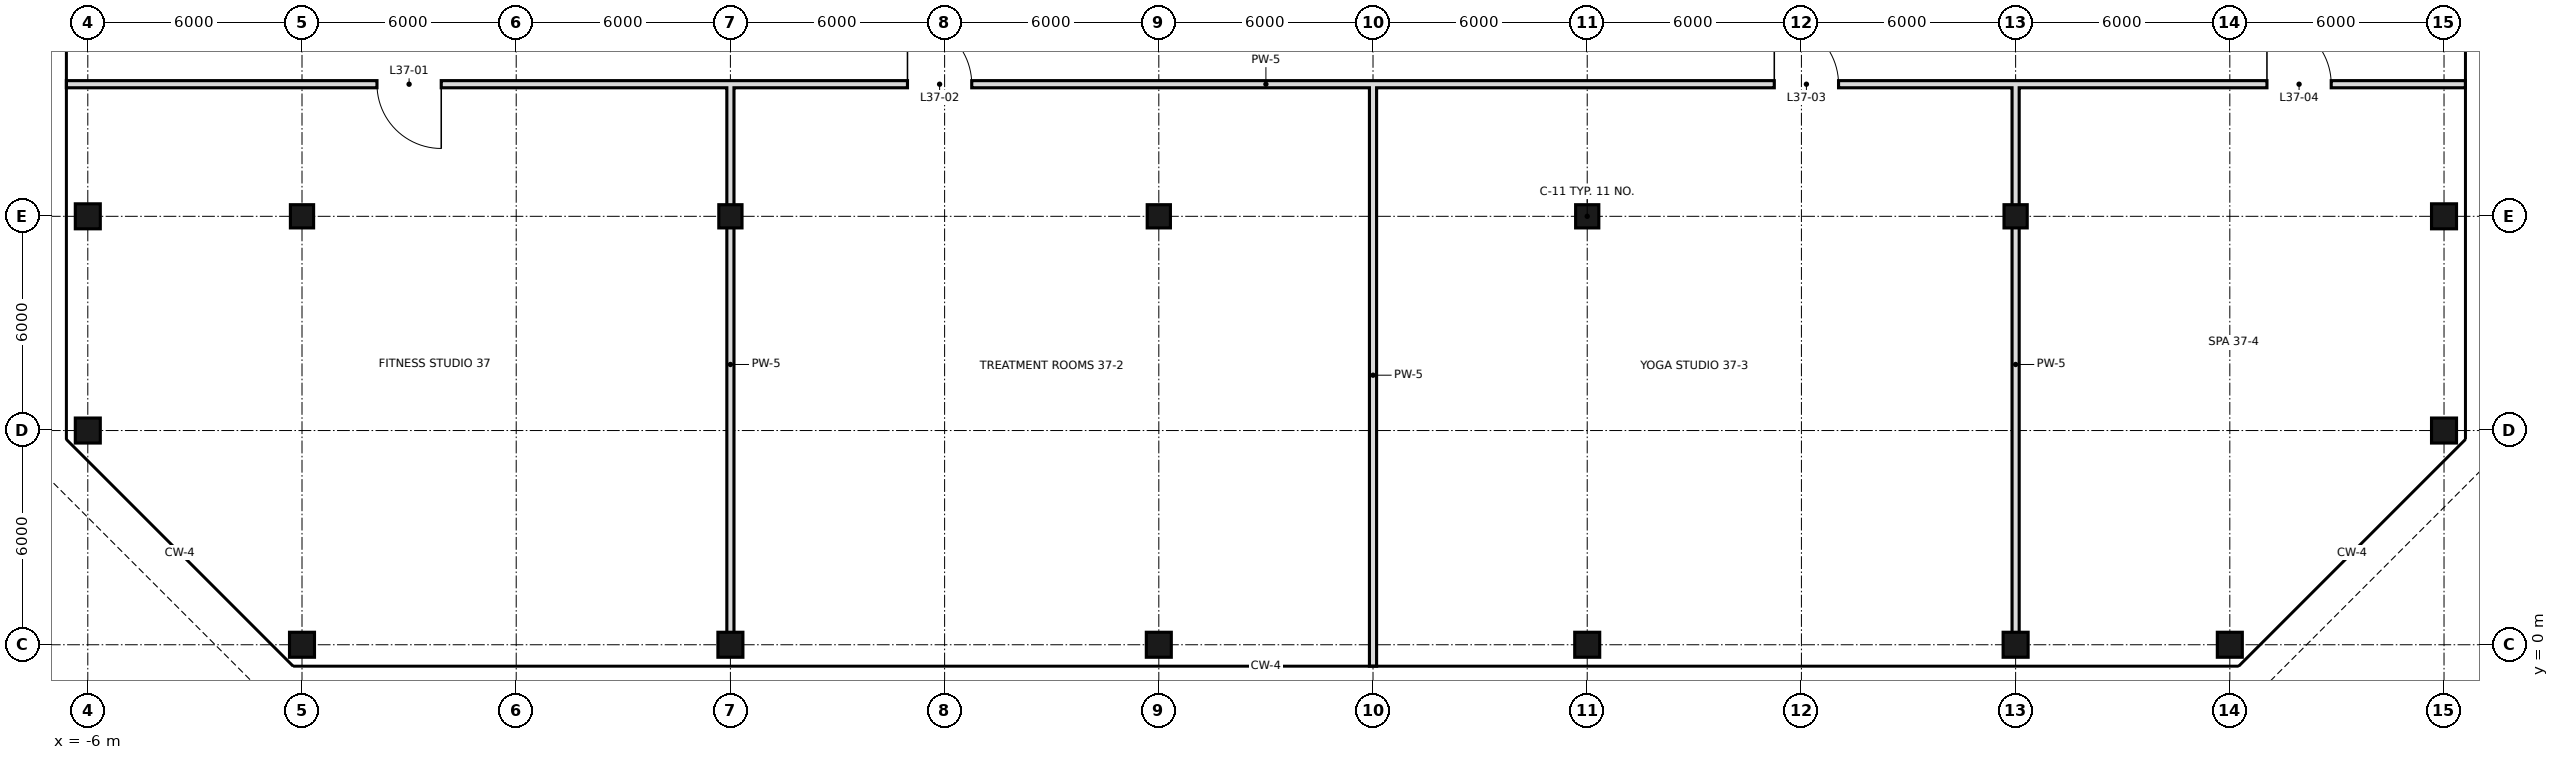
"""IFC4 building model, lengths in metres.
Left out: names, types, materials, properties, quantities, classifications, styles, units other than length and angle.
Written with IfcOpenShell. Run it as: python <this file> out.ifc"""

import sys

from ifc_helpers import new_model, si_unit, direction, frame, frame_2d, origin, origin_2d, place, context, subcontext, project, spatial, rectangle, hollow_rectangle, extrude, element, fill, save


model = new_model("IFC4")
c1 = context("Model", 3, precision=1e-05, world=origin(), true_north=direction((0.0, 1.0)))
c2 = subcontext(c1, "Body", "Model", "MODEL_VIEW")
j1 = project(units=[si_unit("LENGTHUNIT", "METRE"), si_unit("PLANEANGLEUNIT", "RADIAN")], contexts=[c1])
p1 = place(None, origin())
s1 = spatial("IfcSite", under=j1, at=p1, CompositionType="ELEMENT")
p2 = place(p1, origin())
s2 = spatial("IfcBuilding", under=s1, at=p2, CompositionType="ELEMENT")
p3 = place(p2, frame((0.0, 0.0, 161.8)))
s3 = spatial("IfcBuildingStorey", under=s2, at=p3, CompositionType="ELEMENT", Elevation=161.8)
for number, where, z_axis, x_axis in (
    (1, (-6.0, 6.0, 0.0), (0.0, 0.0, 1.0), (1.0, 0.0, 0.0)),
    (2, (-6.0, 12.0, 0.0), (0.0, 0.0, 1.0), (1.0, 0.0, 0.0)),
    (3, (0.0, 0.0, 0.0), (0.0, 0.0, 1.0), (1.0, 0.0, 0.0)),
):
    element("IfcColumn", number, at=place(p3, frame(where, z_axis=z_axis, x_axis=x_axis)), inside=s3, PredefinedType="COLUMN", context=c2, shape_type="SweptSolid", body=[
        extrude(hollow_rectangle(XDim=0.7, YDim=0.7, WallThickness=0.036, at=origin_2d()), origin(), (0.0, 0.0, 1.0), 5.4),
    ])
p4 = place(p3, frame((0.0, 12.0, 0.0), z_axis=(0.0, 0.0, 1.0), x_axis=(1.0, 0.0, 0.0)))
e4 = element("IfcColumn", 4, at=p4, inside=s3, PredefinedType="COLUMN", context=c2, shape_type="SweptSolid", body=[
    extrude(hollow_rectangle(XDim=0.65, YDim=0.65, WallThickness=0.032, at=origin_2d()), origin(), (0.0, 0.0, 1.0), 5.4),
])
p5 = place(p3, frame((12.0, 0.0, 0.0), z_axis=(0.0, 0.0, 1.0), x_axis=(1.0, 0.0, 0.0)))
e5 = element("IfcColumn", 5, at=p5, inside=s3, PredefinedType="COLUMN", context=c2, shape_type="SweptSolid", body=[
    extrude(hollow_rectangle(XDim=0.7, YDim=0.7, WallThickness=0.036, at=origin_2d()), origin(), (0.0, 0.0, 1.0), 5.4),
])
p6 = place(p3, frame((12.0, 12.0, 0.0), z_axis=(0.0, 0.0, 1.0), x_axis=(1.0, 0.0, 0.0)))
e6 = element("IfcColumn", 6, at=p6, inside=s3, PredefinedType="COLUMN", context=c2, shape_type="SweptSolid", body=[
    extrude(hollow_rectangle(XDim=0.65, YDim=0.65, WallThickness=0.032, at=origin_2d()), origin(), (0.0, 0.0, 1.0), 5.4),
])
p7 = place(p3, frame((24.0, 0.0, 0.0), z_axis=(0.0, 0.0, 1.0), x_axis=(1.0, 0.0, 0.0)))
e7 = element("IfcColumn", 7, at=p7, inside=s3, PredefinedType="COLUMN", context=c2, shape_type="SweptSolid", body=[
    extrude(hollow_rectangle(XDim=0.7, YDim=0.7, WallThickness=0.036, at=origin_2d()), origin(), (0.0, 0.0, 1.0), 5.4),
])
p8 = place(p3, frame((24.0, 12.0, 0.0), z_axis=(0.0, 0.0, 1.0), x_axis=(1.0, 0.0, 0.0)))
e8 = element("IfcColumn", 8, at=p8, inside=s3, PredefinedType="COLUMN", context=c2, shape_type="SweptSolid", body=[
    extrude(hollow_rectangle(XDim=0.65, YDim=0.65, WallThickness=0.032, at=origin_2d()), origin(), (0.0, 0.0, 1.0), 5.4),
])
p9 = place(p3, frame((36.0, 0.0, 0.0), z_axis=(0.0, 0.0, 1.0), x_axis=(1.0, 0.0, 0.0)))
e9 = element("IfcColumn", 9, at=p9, inside=s3, PredefinedType="COLUMN", context=c2, shape_type="SweptSolid", body=[
    extrude(hollow_rectangle(XDim=0.7, YDim=0.7, WallThickness=0.036, at=origin_2d()), origin(), (0.0, 0.0, 1.0), 5.4),
])
p10 = place(p3, frame((36.0, 12.0, 0.0), z_axis=(0.0, 0.0, 1.0), x_axis=(1.0, 0.0, 0.0)))
e10 = element("IfcColumn", 10, at=p10, inside=s3, PredefinedType="COLUMN", context=c2, shape_type="SweptSolid", body=[
    extrude(hollow_rectangle(XDim=0.65, YDim=0.65, WallThickness=0.032, at=origin_2d()), origin(), (0.0, 0.0, 1.0), 5.4),
])
p11 = place(p3, frame((48.0, 0.0, 0.0), z_axis=(0.0, 0.0, 1.0), x_axis=(1.0, 0.0, 0.0)))
e11 = element("IfcColumn", 11, at=p11, inside=s3, PredefinedType="COLUMN", context=c2, shape_type="SweptSolid", body=[
    extrude(hollow_rectangle(XDim=0.7, YDim=0.7, WallThickness=0.036, at=origin_2d()), origin(), (0.0, 0.0, 1.0), 5.4),
])
p12 = place(p3, frame((48.0, 12.0, 0.0), z_axis=(0.0, 0.0, 1.0), x_axis=(1.0, 0.0, 0.0)))
e12 = element("IfcColumn", 12, at=p12, inside=s3, PredefinedType="COLUMN", context=c2, shape_type="SweptSolid", body=[
    extrude(hollow_rectangle(XDim=0.65, YDim=0.65, WallThickness=0.032, at=origin_2d()), origin(), (0.0, 0.0, 1.0), 5.4),
])
for number, where, z_axis, x_axis in (
    (13, (54.0, 0.0, 0.0), (0.0, 0.0, 1.0), (1.0, 0.0, 0.0)),
    (14, (60.0, 6.0, 0.0), (0.0, 0.0, 1.0), (1.0, 0.0, 0.0)),
    (15, (60.0, 12.0, 0.0), (0.0, 0.0, 1.0), (1.0, 0.0, 0.0)),
):
    element("IfcColumn", number, at=place(p3, frame(where, z_axis=z_axis, x_axis=x_axis)), inside=s3, PredefinedType="COLUMN", context=c2, shape_type="SweptSolid", body=[
        extrude(hollow_rectangle(XDim=0.7, YDim=0.7, WallThickness=0.036, at=origin_2d()), origin(), (0.0, 0.0, 1.0), 5.4),
    ])
p13 = place(p3, frame((12.0, 0.0, 0.0), z_axis=(0.0, 0.0, 1.0), x_axis=(0.0, 1.0, 0.0)))
e16 = element("IfcWall", 16, at=p13, inside=s3, PredefinedType="SOLIDWALL", context=c2, shape_type="SweptSolid", body=[
    extrude(rectangle(XDim=15.7, YDim=0.2, at=frame_2d((7.85, 0.0))), origin(), (0.0, 0.0, 1.0), 4.52),
])
p14 = place(p3, frame((30.0, -0.6, 0.0), z_axis=(0.0, 0.0, 1.0), x_axis=(0.0, 1.0, 0.0)))
e17 = element("IfcWall", 17, at=p14, inside=s3, PredefinedType="SOLIDWALL", context=c2, shape_type="SweptSolid", body=[
    extrude(rectangle(XDim=16.3, YDim=0.2, at=frame_2d((8.15, 0.0))), origin(), (0.0, 0.0, 1.0), 4.52),
])
p15 = place(p3, frame((48.0, 0.0, 0.0), z_axis=(0.0, 0.0, 1.0), x_axis=(0.0, 1.0, 0.0)))
e18 = element("IfcWall", 18, at=p15, inside=s3, PredefinedType="SOLIDWALL", context=c2, shape_type="SweptSolid", body=[
    extrude(rectangle(XDim=15.7, YDim=0.2, at=frame_2d((7.85, 0.0))), origin(), (0.0, 0.0, 1.0), 4.52),
])
p16 = place(p3, frame((-6.6, 15.7, 0.0), z_axis=(0.0, 0.0, 1.0), x_axis=(1.0, 0.0, 0.0)))
e19 = element("IfcWall", 19, at=p16, inside=s3, PredefinedType="SOLIDWALL", context=c2, shape_type="SweptSolid", body=[
    extrude(rectangle(XDim=67.2, YDim=0.2, at=frame_2d((33.6, 0.0))), origin(), (0.0, 0.0, 1.0), 4.52),
])
p17 = place(p16, frame((8.7, 0.0, 0.0)))
e20 = element("IfcOpeningElement", 20, at=p17, cuts=e19, PredefinedType="OPENING", context=c2, shape_type="SweptSolid", body=[
    extrude(rectangle(XDim=1.8, YDim=2.4, at=frame_2d((0.9, 1.2))), frame((0.0, 0.11, 0.0), z_axis=(0.0, -1.0, 0.0), x_axis=(1.0, 0.0, 0.0)), (0.0, 0.0, 1.0), 0.22),
])
p18 = place(p16, frame((23.56, 0.0, 0.0)))
e21 = element("IfcOpeningElement", 21, at=p18, cuts=e19, PredefinedType="OPENING", context=c2, shape_type="SweptSolid", body=[
    extrude(rectangle(XDim=1.8, YDim=2.4, at=frame_2d((0.9, 1.2))), frame((0.0, 0.11, 0.0), z_axis=(0.0, -1.0, 0.0), x_axis=(1.0, 0.0, 0.0)), (0.0, 0.0, 1.0), 0.22),
])
p19 = place(p16, frame((47.84, 0.0, 0.0)))
e22 = element("IfcOpeningElement", 22, at=p19, cuts=e19, PredefinedType="OPENING", context=c2, shape_type="SweptSolid", body=[
    extrude(rectangle(XDim=1.8, YDim=2.4, at=frame_2d((0.9, 1.2))), frame((0.0, 0.11, 0.0), z_axis=(0.0, -1.0, 0.0), x_axis=(1.0, 0.0, 0.0)), (0.0, 0.0, 1.0), 0.22),
])
p20 = place(p16, frame((61.64, 0.0, 0.0)))
e23 = element("IfcOpeningElement", 23, at=p20, cuts=e19, PredefinedType="OPENING", context=c2, shape_type="SweptSolid", body=[
    extrude(rectangle(XDim=1.8, YDim=2.4, at=frame_2d((0.9, 1.2))), frame((0.0, 0.11, 0.0), z_axis=(0.0, -1.0, 0.0), x_axis=(1.0, 0.0, 0.0)), (0.0, 0.0, 1.0), 0.22),
])
p21 = place(p17, origin())
e24 = element("IfcDoor", 24, at=p21, inside=s3, OperationType="SINGLE_SWING_RIGHT", PredefinedType="DOOR", context=c2, shape_type="SweptSolid", body=[
    extrude(rectangle(XDim=1.8, YDim=2.4, at=frame_2d((0.9, 1.2))), frame((0.0, 0.025, 0.0), z_axis=(0.0, -1.0, 0.0), x_axis=(1.0, 0.0, 0.0)), (0.0, 0.0, 1.0), 0.05),
])
fill(e20, e24)
p22 = place(p18, origin())
e25 = element("IfcDoor", 25, at=p22, inside=s3, OperationType="SINGLE_SWING_LEFT", PredefinedType="DOOR", context=c2, shape_type="SweptSolid", body=[
    extrude(rectangle(XDim=1.8, YDim=2.4, at=frame_2d((0.9, 1.2))), frame((0.0, 0.025, 0.0), z_axis=(0.0, -1.0, 0.0), x_axis=(1.0, 0.0, 0.0)), (0.0, 0.0, 1.0), 0.05),
])
fill(e21, e25)
p23 = place(p19, origin())
e26 = element("IfcDoor", 26, at=p23, inside=s3, OperationType="SINGLE_SWING_LEFT", PredefinedType="DOOR", context=c2, shape_type="SweptSolid", body=[
    extrude(rectangle(XDim=1.8, YDim=2.4, at=frame_2d((0.9, 1.2))), frame((0.0, 0.025, 0.0), z_axis=(0.0, -1.0, 0.0), x_axis=(1.0, 0.0, 0.0)), (0.0, 0.0, 1.0), 0.05),
])
fill(e22, e26)
p24 = place(p20, origin())
e27 = element("IfcDoor", 27, at=p24, inside=s3, OperationType="SINGLE_SWING_LEFT", PredefinedType="DOOR", context=c2, shape_type="SweptSolid", body=[
    extrude(rectangle(XDim=1.8, YDim=2.4, at=frame_2d((0.9, 1.2))), frame((0.0, 0.025, 0.0), z_axis=(0.0, -1.0, 0.0), x_axis=(1.0, 0.0, 0.0)), (0.0, 0.0, 1.0), 0.05),
])
fill(e23, e27)
save(model, sys.argv[1])
